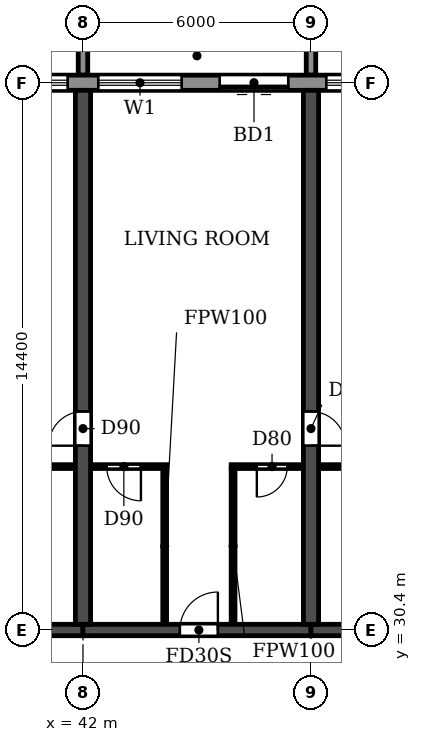
"""IFC4 building model, lengths in metres.
Left out: names, types, materials, properties, quantities, classifications, styles, units other than length and angle.
Written with IfcOpenShell. Run it as: python <this file> out.ifc"""

import sys

from ifc_helpers import new_model, si_unit, direction, frame, frame_2d, origin, place, context, subcontext, project, spatial, polyline, rectangle, outline, extrude, source, transform, mapped, element, fill, save


model = new_model("IFC4")
c1 = context("Model", 3, precision=1e-05, world=origin(), true_north=direction((0.0, 1.0)))
c2 = subcontext(c1, "Body", "Model", "MODEL_VIEW")
j1 = project(units=[si_unit("LENGTHUNIT", "METRE"), si_unit("PLANEANGLEUNIT", "RADIAN")], contexts=[c1])
p1 = place(None, origin())
s1 = spatial("IfcSite", under=j1, at=p1, CompositionType="ELEMENT")
p2 = place(p1, origin())
s2 = spatial("IfcBuilding", under=s1, at=p2, CompositionType="ELEMENT")
p3 = place(p2, frame((0.0, 0.0, 49.8)))
s3 = spatial("IfcBuildingStorey", under=s2, at=p3, CompositionType="ELEMENT", Elevation=49.8)
p4 = place(p3, frame((42.0, 30.55, 0.0), z_axis=(0.0, 0.0, 1.0), x_axis=(0.0, 1.0, 0.0)))
e1 = element("IfcWall", 1, at=p4, inside=s3, PredefinedType="SHEAR", context=c2, shape_type="SweptSolid", body=[
    extrude(rectangle(XDim=14.05, YDim=0.4, at=frame_2d((7.025, 0.0))), origin(), (0.0, 0.0, 1.0), 3.0),
])
p5 = place(p4, frame((4.7, 0.0, 0.0)))
e2 = element("IfcOpeningElement", 2, at=p5, cuts=e1, PredefinedType="OPENING", context=c2, shape_type="SweptSolid", body=[
    extrude(rectangle(XDim=0.9, YDim=2.1, at=frame_2d((0.45, 1.05))), frame((0.0, 0.21, 0.0), z_axis=(0.0, -1.0, 0.0), x_axis=(1.0, 0.0, 0.0)), (0.0, 0.0, 1.0), 0.42),
])
p6 = place(p3, frame((48.0, 30.55, 0.0), z_axis=(0.0, 0.0, 1.0), x_axis=(0.0, 1.0, 0.0)))
e3 = element("IfcWall", 3, at=p6, inside=s3, PredefinedType="SHEAR", context=c2, shape_type="SweptSolid", body=[
    extrude(rectangle(XDim=14.05, YDim=0.4, at=frame_2d((7.025, 0.0))), origin(), (0.0, 0.0, 1.0), 3.0),
])
p7 = place(p6, frame((4.7, 0.0, 0.0)))
e4 = element("IfcOpeningElement", 4, at=p7, cuts=e3, PredefinedType="OPENING", context=c2, shape_type="SweptSolid", body=[
    extrude(rectangle(XDim=0.9, YDim=2.1, at=frame_2d((0.45, 1.05))), frame((0.0, 0.21, 0.0), z_axis=(0.0, -1.0, 0.0), x_axis=(1.0, 0.0, 0.0)), (0.0, 0.0, 1.0), 0.42),
])
p8 = place(p3, frame((36.0, 30.4, 0.0), z_axis=(0.0, 0.0, 1.0), x_axis=(1.0, 0.0, 0.0)))
e5 = element("IfcWall", 5, at=p8, inside=s3, PredefinedType="SHEAR", context=c2, shape_type="SweptSolid", body=[
    extrude(rectangle(XDim=6.0, YDim=0.3, at=frame_2d((3.0, 0.0))), origin(), (0.0, 0.0, 1.0), 2.4),
])
p9 = place(p3, frame((42.0, 30.4, 0.0), z_axis=(0.0, 0.0, 1.0), x_axis=(1.0, 0.0, 0.0)))
e6 = element("IfcWall", 6, at=p9, inside=s3, PredefinedType="SHEAR", context=c2, shape_type="SweptSolid", body=[
    extrude(rectangle(XDim=6.0, YDim=0.3, at=frame_2d((3.0, 0.0))), origin(), (0.0, 0.0, 1.0), 2.4),
])
p10 = place(p9, frame((2.55, 0.0, 0.0)))
e7 = element("IfcOpeningElement", 7, at=p10, cuts=e6, PredefinedType="OPENING", context=c2, shape_type="SweptSolid", body=[
    extrude(rectangle(XDim=1.0, YDim=2.1, at=frame_2d((0.5, 1.05))), frame((0.0, 0.16, 0.0), z_axis=(0.0, -1.0, 0.0), x_axis=(1.0, 0.0, 0.0)), (0.0, 0.0, 1.0), 0.32),
])
p11 = place(p3, frame((48.0, 30.4, 0.0), z_axis=(0.0, 0.0, 1.0), x_axis=(1.0, 0.0, 0.0)))
e8 = element("IfcWall", 8, at=p11, inside=s3, PredefinedType="SHEAR", context=c2, shape_type="SweptSolid", body=[
    extrude(rectangle(XDim=6.0, YDim=0.3, at=frame_2d((3.0, 0.0))), origin(), (0.0, 0.0, 1.0), 2.4),
])
p12 = place(p3, frame((97.317, 44.8, 0.0), z_axis=(0.0, 0.0, 1.0), x_axis=(-1.0, 0.0, 0.0)))
e9 = element("IfcWall", 9, at=p12, inside=s3, PredefinedType="STANDARD", context=c2, shape_type="SweptSolid", body=[
    extrude(rectangle(XDim=92.634, YDim=0.4, at=frame_2d((46.317, 0.0))), origin(), (0.0, 0.0, 1.0), 3.0),
])
p13 = place(p12, frame((88.917, 0.0, 0.0)))
e10 = element("IfcOpeningElement", 10, at=p13, cuts=e9, PredefinedType="OPENING", context=c2, shape_type="SweptSolid", body=[
    extrude(rectangle(XDim=1.8, YDim=2.4, at=frame_2d((0.9, 1.2))), frame((0.0, 0.21, 0.0), z_axis=(0.0, -1.0, 0.0), x_axis=(1.0, 0.0, 0.0)), (0.0, 0.0, 1.0), 0.42),
])
p14 = place(p12, frame((85.717, 0.0, 0.9)))
e11 = element("IfcOpeningElement", 11, at=p14, cuts=e9, PredefinedType="OPENING", context=c2, shape_type="SweptSolid", body=[
    extrude(rectangle(XDim=2.2, YDim=1.5, at=frame_2d((1.1, 0.75))), frame((0.0, 0.21, 0.0), z_axis=(0.0, -1.0, 0.0), x_axis=(1.0, 0.0, 0.0)), (0.0, 0.0, 1.0), 0.42),
])
p15 = place(p12, frame((82.717, 0.0, 0.9)))
e12 = element("IfcOpeningElement", 12, at=p15, cuts=e9, PredefinedType="OPENING", context=c2, shape_type="SweptSolid", body=[
    extrude(rectangle(XDim=2.2, YDim=1.5, at=frame_2d((1.1, 0.75))), frame((0.0, 0.21, 0.0), z_axis=(0.0, -1.0, 0.0), x_axis=(1.0, 0.0, 0.0)), (0.0, 0.0, 1.0), 0.42),
])
p16 = place(p12, frame((79.717, 0.0, 0.9)))
e13 = element("IfcOpeningElement", 13, at=p16, cuts=e9, PredefinedType="OPENING", context=c2, shape_type="SweptSolid", body=[
    extrude(rectangle(XDim=2.2, YDim=1.5, at=frame_2d((1.1, 0.75))), frame((0.0, 0.21, 0.0), z_axis=(0.0, -1.0, 0.0), x_axis=(1.0, 0.0, 0.0)), (0.0, 0.0, 1.0), 0.42),
])
p17 = place(p12, frame((76.717, 0.0, 0.9)))
e14 = element("IfcOpeningElement", 14, at=p17, cuts=e9, PredefinedType="OPENING", context=c2, shape_type="SweptSolid", body=[
    extrude(rectangle(XDim=2.2, YDim=1.5, at=frame_2d((1.1, 0.75))), frame((0.0, 0.21, 0.0), z_axis=(0.0, -1.0, 0.0), x_axis=(1.0, 0.0, 0.0)), (0.0, 0.0, 1.0), 0.42),
])
p18 = place(p12, frame((73.917, 0.0, 0.0)))
e15 = element("IfcOpeningElement", 15, at=p18, cuts=e9, PredefinedType="OPENING", context=c2, shape_type="SweptSolid", body=[
    extrude(rectangle(XDim=1.8, YDim=2.4, at=frame_2d((0.9, 1.2))), frame((0.0, 0.21, 0.0), z_axis=(0.0, -1.0, 0.0), x_axis=(1.0, 0.0, 0.0)), (0.0, 0.0, 1.0), 0.42),
])
p19 = place(p12, frame((70.717, 0.0, 0.9)))
e16 = element("IfcOpeningElement", 16, at=p19, cuts=e9, PredefinedType="OPENING", context=c2, shape_type="SweptSolid", body=[
    extrude(rectangle(XDim=2.2, YDim=1.5, at=frame_2d((1.1, 0.75))), frame((0.0, 0.21, 0.0), z_axis=(0.0, -1.0, 0.0), x_axis=(1.0, 0.0, 0.0)), (0.0, 0.0, 1.0), 0.42),
])
p20 = place(p12, frame((67.717, 0.0, 0.9)))
e17 = element("IfcOpeningElement", 17, at=p20, cuts=e9, PredefinedType="OPENING", context=c2, shape_type="SweptSolid", body=[
    extrude(rectangle(XDim=2.2, YDim=1.5, at=frame_2d((1.1, 0.75))), frame((0.0, 0.21, 0.0), z_axis=(0.0, -1.0, 0.0), x_axis=(1.0, 0.0, 0.0)), (0.0, 0.0, 1.0), 0.42),
])
p21 = place(p12, frame((64.717, 0.0, 0.9)))
e18 = element("IfcOpeningElement", 18, at=p21, cuts=e9, PredefinedType="OPENING", context=c2, shape_type="SweptSolid", body=[
    extrude(rectangle(XDim=2.2, YDim=1.5, at=frame_2d((1.1, 0.75))), frame((0.0, 0.21, 0.0), z_axis=(0.0, -1.0, 0.0), x_axis=(1.0, 0.0, 0.0)), (0.0, 0.0, 1.0), 0.42),
])
p22 = place(p12, frame((61.917, 0.0, 0.0)))
e19 = element("IfcOpeningElement", 19, at=p22, cuts=e9, PredefinedType="OPENING", context=c2, shape_type="SweptSolid", body=[
    extrude(rectangle(XDim=1.8, YDim=2.4, at=frame_2d((0.9, 1.2))), frame((0.0, 0.21, 0.0), z_axis=(0.0, -1.0, 0.0), x_axis=(1.0, 0.0, 0.0)), (0.0, 0.0, 1.0), 0.42),
])
p23 = place(p12, frame((58.717, 0.0, 0.9)))
e20 = element("IfcOpeningElement", 20, at=p23, cuts=e9, PredefinedType="OPENING", context=c2, shape_type="SweptSolid", body=[
    extrude(rectangle(XDim=2.2, YDim=1.5, at=frame_2d((1.1, 0.75))), frame((0.0, 0.21, 0.0), z_axis=(0.0, -1.0, 0.0), x_axis=(1.0, 0.0, 0.0)), (0.0, 0.0, 1.0), 0.42),
])
p24 = place(p12, frame((55.717, 0.0, 0.9)))
e21 = element("IfcOpeningElement", 21, at=p24, cuts=e9, PredefinedType="OPENING", context=c2, shape_type="SweptSolid", body=[
    extrude(rectangle(XDim=2.2, YDim=1.5, at=frame_2d((1.1, 0.75))), frame((0.0, 0.21, 0.0), z_axis=(0.0, -1.0, 0.0), x_axis=(1.0, 0.0, 0.0)), (0.0, 0.0, 1.0), 0.42),
])
p25 = place(p12, frame((52.717, 0.0, 0.9)))
e22 = element("IfcOpeningElement", 22, at=p25, cuts=e9, PredefinedType="OPENING", context=c2, shape_type="SweptSolid", body=[
    extrude(rectangle(XDim=2.2, YDim=1.5, at=frame_2d((1.1, 0.75))), frame((0.0, 0.21, 0.0), z_axis=(0.0, -1.0, 0.0), x_axis=(1.0, 0.0, 0.0)), (0.0, 0.0, 1.0), 0.42),
])
p26 = place(p12, frame((49.917, 0.0, 0.0)))
e23 = element("IfcOpeningElement", 23, at=p26, cuts=e9, PredefinedType="OPENING", context=c2, shape_type="SweptSolid", body=[
    extrude(rectangle(XDim=1.8, YDim=2.4, at=frame_2d((0.9, 1.2))), frame((0.0, 0.21, 0.0), z_axis=(0.0, -1.0, 0.0), x_axis=(1.0, 0.0, 0.0)), (0.0, 0.0, 1.0), 0.42),
])
p27 = place(p12, frame((46.717, 0.0, 0.9)))
e24 = element("IfcOpeningElement", 24, at=p27, cuts=e9, PredefinedType="OPENING", context=c2, shape_type="SweptSolid", body=[
    extrude(rectangle(XDim=2.2, YDim=1.5, at=frame_2d((1.1, 0.75))), frame((0.0, 0.21, 0.0), z_axis=(0.0, -1.0, 0.0), x_axis=(1.0, 0.0, 0.0)), (0.0, 0.0, 1.0), 0.42),
])
p28 = place(p12, frame((43.717, 0.0, 0.9)))
e25 = element("IfcOpeningElement", 25, at=p28, cuts=e9, PredefinedType="OPENING", context=c2, shape_type="SweptSolid", body=[
    extrude(rectangle(XDim=2.2, YDim=1.5, at=frame_2d((1.1, 0.75))), frame((0.0, 0.21, 0.0), z_axis=(0.0, -1.0, 0.0), x_axis=(1.0, 0.0, 0.0)), (0.0, 0.0, 1.0), 0.42),
])
p29 = place(p12, frame((40.717, 0.0, 0.9)))
e26 = element("IfcOpeningElement", 26, at=p29, cuts=e9, PredefinedType="OPENING", context=c2, shape_type="SweptSolid", body=[
    extrude(rectangle(XDim=2.2, YDim=1.5, at=frame_2d((1.1, 0.75))), frame((0.0, 0.21, 0.0), z_axis=(0.0, -1.0, 0.0), x_axis=(1.0, 0.0, 0.0)), (0.0, 0.0, 1.0), 0.42),
])
p30 = place(p12, frame((37.917, 0.0, 0.0)))
e27 = element("IfcOpeningElement", 27, at=p30, cuts=e9, PredefinedType="OPENING", context=c2, shape_type="SweptSolid", body=[
    extrude(rectangle(XDim=1.8, YDim=2.4, at=frame_2d((0.9, 1.2))), frame((0.0, 0.21, 0.0), z_axis=(0.0, -1.0, 0.0), x_axis=(1.0, 0.0, 0.0)), (0.0, 0.0, 1.0), 0.42),
])
p31 = place(p12, frame((34.717, 0.0, 0.9)))
e28 = element("IfcOpeningElement", 28, at=p31, cuts=e9, PredefinedType="OPENING", context=c2, shape_type="SweptSolid", body=[
    extrude(rectangle(XDim=2.2, YDim=1.5, at=frame_2d((1.1, 0.75))), frame((0.0, 0.21, 0.0), z_axis=(0.0, -1.0, 0.0), x_axis=(1.0, 0.0, 0.0)), (0.0, 0.0, 1.0), 0.42),
])
p32 = place(p12, frame((31.717, 0.0, 0.9)))
e29 = element("IfcOpeningElement", 29, at=p32, cuts=e9, PredefinedType="OPENING", context=c2, shape_type="SweptSolid", body=[
    extrude(rectangle(XDim=2.2, YDim=1.5, at=frame_2d((1.1, 0.75))), frame((0.0, 0.21, 0.0), z_axis=(0.0, -1.0, 0.0), x_axis=(1.0, 0.0, 0.0)), (0.0, 0.0, 1.0), 0.42),
])
p33 = place(p12, frame((28.717, 0.0, 0.9)))
e30 = element("IfcOpeningElement", 30, at=p33, cuts=e9, PredefinedType="OPENING", context=c2, shape_type="SweptSolid", body=[
    extrude(rectangle(XDim=2.2, YDim=1.5, at=frame_2d((1.1, 0.75))), frame((0.0, 0.21, 0.0), z_axis=(0.0, -1.0, 0.0), x_axis=(1.0, 0.0, 0.0)), (0.0, 0.0, 1.0), 0.42),
])
p34 = place(p12, frame((25.917, 0.0, 0.0)))
e31 = element("IfcOpeningElement", 31, at=p34, cuts=e9, PredefinedType="OPENING", context=c2, shape_type="SweptSolid", body=[
    extrude(rectangle(XDim=1.8, YDim=2.4, at=frame_2d((0.9, 1.2))), frame((0.0, 0.21, 0.0), z_axis=(0.0, -1.0, 0.0), x_axis=(1.0, 0.0, 0.0)), (0.0, 0.0, 1.0), 0.42),
])
p35 = place(p12, frame((22.917, 0.0, 0.0)))
e32 = element("IfcOpeningElement", 32, at=p35, cuts=e9, PredefinedType="OPENING", context=c2, shape_type="SweptSolid", body=[
    extrude(rectangle(XDim=1.8, YDim=2.4, at=frame_2d((0.9, 1.2))), frame((0.0, 0.21, 0.0), z_axis=(0.0, -1.0, 0.0), x_axis=(1.0, 0.0, 0.0)), (0.0, 0.0, 1.0), 0.42),
])
p36 = place(p12, frame((19.717, 0.0, 0.9)))
e33 = element("IfcOpeningElement", 33, at=p36, cuts=e9, PredefinedType="OPENING", context=c2, shape_type="SweptSolid", body=[
    extrude(rectangle(XDim=2.2, YDim=1.5, at=frame_2d((1.1, 0.75))), frame((0.0, 0.21, 0.0), z_axis=(0.0, -1.0, 0.0), x_axis=(1.0, 0.0, 0.0)), (0.0, 0.0, 1.0), 0.42),
])
p37 = place(p12, frame((16.717, 0.0, 0.9)))
e34 = element("IfcOpeningElement", 34, at=p37, cuts=e9, PredefinedType="OPENING", context=c2, shape_type="SweptSolid", body=[
    extrude(rectangle(XDim=2.2, YDim=1.5, at=frame_2d((1.1, 0.75))), frame((0.0, 0.21, 0.0), z_axis=(0.0, -1.0, 0.0), x_axis=(1.0, 0.0, 0.0)), (0.0, 0.0, 1.0), 0.42),
])
p38 = place(p12, frame((13.717, 0.0, 0.9)))
e35 = element("IfcOpeningElement", 35, at=p38, cuts=e9, PredefinedType="OPENING", context=c2, shape_type="SweptSolid", body=[
    extrude(rectangle(XDim=2.2, YDim=1.5, at=frame_2d((1.1, 0.75))), frame((0.0, 0.21, 0.0), z_axis=(0.0, -1.0, 0.0), x_axis=(1.0, 0.0, 0.0)), (0.0, 0.0, 1.0), 0.42),
])
p39 = place(p12, frame((10.717, 0.0, 0.9)))
e36 = element("IfcOpeningElement", 36, at=p39, cuts=e9, PredefinedType="OPENING", context=c2, shape_type="SweptSolid", body=[
    extrude(rectangle(XDim=2.2, YDim=1.5, at=frame_2d((1.1, 0.75))), frame((0.0, 0.21, 0.0), z_axis=(0.0, -1.0, 0.0), x_axis=(1.0, 0.0, 0.0)), (0.0, 0.0, 1.0), 0.42),
])
p40 = place(p12, frame((7.917, 0.0, 0.0)))
e37 = element("IfcOpeningElement", 37, at=p40, cuts=e9, PredefinedType="OPENING", context=c2, shape_type="SweptSolid", body=[
    extrude(rectangle(XDim=1.8, YDim=2.4, at=frame_2d((0.9, 1.2))), frame((0.0, 0.21, 0.0), z_axis=(0.0, -1.0, 0.0), x_axis=(1.0, 0.0, 0.0)), (0.0, 0.0, 1.0), 0.42),
])
p41 = place(p12, frame((4.717, 0.0, 0.9)))
e38 = element("IfcOpeningElement", 38, at=p41, cuts=e9, PredefinedType="OPENING", context=c2, shape_type="SweptSolid", body=[
    extrude(rectangle(XDim=2.2, YDim=1.5, at=frame_2d((1.1, 0.75))), frame((0.0, 0.21, 0.0), z_axis=(0.0, -1.0, 0.0), x_axis=(1.0, 0.0, 0.0)), (0.0, 0.0, 1.0), 0.42),
])
p42 = place(p12, frame((1.917, 0.0, 0.0)))
e39 = element("IfcOpeningElement", 39, at=p42, cuts=e9, PredefinedType="OPENING", context=c2, shape_type="SweptSolid", body=[
    extrude(rectangle(XDim=1.8, YDim=2.4, at=frame_2d((0.9, 1.2))), frame((0.0, 0.21, 0.0), z_axis=(0.0, -1.0, 0.0), x_axis=(1.0, 0.0, 0.0)), (0.0, 0.0, 1.0), 0.42),
])
m1 = source(origin(), c2, "Body", "SweptSolid", [
    extrude(outline(polyline([(0.0, 0.0), (0.25, 0.0), (0.25, 3.1), (0.0, 3.1), (0.0, 0.0)])), origin(), (0.0, 0.0, 1.0), 3.1),
])
for number, where in (
    (40, (41.875, 45.0, 0.0)),
    (41, (47.875, 45.0, 0.0)),
):
    element("IfcWall", number, at=place(p3, frame(where)), inside=s3, PredefinedType="STANDARD", context=c2, shape_type="MappedRepresentation", body=[
        mapped(m1, transform((0.0, 0.0, 0.0))),
    ])
p43 = place(p3, frame((39.1, 34.7, 0.0), z_axis=(0.0, 0.0, 1.0), x_axis=(1.0, 0.0, 0.0)))
e42 = element("IfcWall", 42, at=p43, inside=s3, PredefinedType="PARTITIONING", context=c2, shape_type="SweptSolid", body=[
    extrude(rectangle(XDim=2.69, YDim=0.1, at=frame_2d((1.345, 0.0))), origin(), (0.0, 0.0, 1.0), 3.0),
])
p44 = place(p43, frame((1.0, 0.0, 0.0)))
e43 = element("IfcOpeningElement", 43, at=p44, cuts=e42, PredefinedType="OPENING", context=c2, shape_type="SweptSolid", body=[
    extrude(rectangle(XDim=0.8, YDim=2.1, at=frame_2d((0.4, 1.05))), frame((0.0, 0.06, 0.0), z_axis=(0.0, -1.0, 0.0), x_axis=(1.0, 0.0, 0.0)), (0.0, 0.0, 1.0), 0.12),
])
p45 = place(p3, frame((42.21, 34.7, 0.0), z_axis=(0.0, 0.0, 1.0), x_axis=(1.0, 0.0, 0.0)))
e44 = element("IfcWall", 44, at=p45, inside=s3, PredefinedType="PARTITIONING", context=c2, shape_type="SweptSolid", body=[
    extrude(rectangle(XDim=1.99, YDim=0.1, at=frame_2d((0.995, 0.0))), origin(), (0.0, 0.0, 1.0), 3.0),
])
p46 = place(p45, frame((0.415, 0.0, 0.0)))
e45 = element("IfcOpeningElement", 45, at=p46, cuts=e44, PredefinedType="OPENING", context=c2, shape_type="SweptSolid", body=[
    extrude(rectangle(XDim=0.9, YDim=2.1, at=frame_2d((0.45, 1.05))), frame((0.0, 0.06, 0.0), z_axis=(0.0, -1.0, 0.0), x_axis=(1.0, 0.0, 0.0)), (0.0, 0.0, 1.0), 0.12),
])
p47 = place(p3, frame((45.9, 34.7, 0.0), z_axis=(0.0, 0.0, 1.0), x_axis=(1.0, 0.0, 0.0)))
e46 = element("IfcWall", 46, at=p47, inside=s3, PredefinedType="PARTITIONING", context=c2, shape_type="SweptSolid", body=[
    extrude(rectangle(XDim=1.89, YDim=0.1, at=frame_2d((0.945, 0.0))), origin(), (0.0, 0.0, 1.0), 3.0),
])
p48 = place(p47, frame((0.675, 0.0, 0.0)))
e47 = element("IfcOpeningElement", 47, at=p48, cuts=e46, PredefinedType="OPENING", context=c2, shape_type="SweptSolid", body=[
    extrude(rectangle(XDim=0.8, YDim=2.1, at=frame_2d((0.4, 1.05))), frame((0.0, 0.06, 0.0), z_axis=(0.0, -1.0, 0.0), x_axis=(1.0, 0.0, 0.0)), (0.0, 0.0, 1.0), 0.12),
])
p49 = place(p3, frame((48.21, 34.7, 0.0), z_axis=(0.0, 0.0, 1.0), x_axis=(1.0, 0.0, 0.0)))
e48 = element("IfcWall", 48, at=p49, inside=s3, PredefinedType="PARTITIONING", context=c2, shape_type="SweptSolid", body=[
    extrude(rectangle(XDim=2.69, YDim=0.1, at=frame_2d((1.345, 0.0))), origin(), (0.0, 0.0, 1.0), 3.0),
])
p50 = place(p49, frame((0.89, 0.0, 0.0)))
e49 = element("IfcOpeningElement", 49, at=p50, cuts=e48, PredefinedType="OPENING", context=c2, shape_type="SweptSolid", body=[
    extrude(rectangle(XDim=0.8, YDim=2.1, at=frame_2d((0.4, 1.05))), frame((0.0, 0.06, 0.0), z_axis=(0.0, -1.0, 0.0), x_axis=(1.0, 0.0, 0.0)), (0.0, 0.0, 1.0), 0.12),
])
for number, where, z_axis, x_axis in (
    (50, (44.15, 30.56, 0.0), (0.0, 0.0, 1.0), (0.0, 1.0, 0.0)),
    (51, (45.95, 30.56, 0.0), (0.0, 0.0, 1.0), (0.0, 1.0, 0.0)),
):
    element("IfcWall", number, at=place(p3, frame(where, z_axis=z_axis, x_axis=x_axis)), inside=s3, PredefinedType="PARTITIONING", context=c2, shape_type="SweptSolid", body=[
        extrude(rectangle(XDim=4.09, YDim=0.1, at=frame_2d((2.045, 0.0))), origin(), (0.0, 0.0, 1.0), 3.0),
    ])
p51 = place(p24, origin())
e52 = element("IfcWindow", 52, at=p51, inside=s3, PartitioningType="DOUBLE_PANEL_HORIZONTAL", PredefinedType="WINDOW", context=c2, shape_type="SweptSolid", body=[
    extrude(rectangle(XDim=2.2, YDim=1.5, at=frame_2d((1.1, 0.75))), frame((0.0, 0.03, 0.0), z_axis=(0.0, -1.0, 0.0), x_axis=(1.0, 0.0, 0.0)), (0.0, 0.0, 1.0), 0.06),
])
fill(e21, e52)
p52 = place(p25, origin())
e53 = element("IfcWindow", 53, at=p52, inside=s3, PartitioningType="DOUBLE_PANEL_HORIZONTAL", PredefinedType="WINDOW", context=c2, shape_type="SweptSolid", body=[
    extrude(rectangle(XDim=2.2, YDim=1.5, at=frame_2d((1.1, 0.75))), frame((0.0, 0.03, 0.0), z_axis=(0.0, -1.0, 0.0), x_axis=(1.0, 0.0, 0.0)), (0.0, 0.0, 1.0), 0.06),
])
fill(e22, e53)
p53 = place(p26, origin())
e54 = element("IfcDoor", 54, at=p53, inside=s3, OperationType="DOUBLE_DOOR_SLIDING", PredefinedType="DOOR", context=c2, shape_type="SweptSolid", body=[
    extrude(rectangle(XDim=1.8, YDim=2.4, at=frame_2d((0.9, 1.2))), frame((0.0, 0.025, 0.0), z_axis=(0.0, -1.0, 0.0), x_axis=(1.0, 0.0, 0.0)), (0.0, 0.0, 1.0), 0.05),
])
fill(e23, e54)
p54 = place(p27, origin())
e55 = element("IfcWindow", 55, at=p54, inside=s3, PartitioningType="DOUBLE_PANEL_HORIZONTAL", PredefinedType="WINDOW", context=c2, shape_type="SweptSolid", body=[
    extrude(rectangle(XDim=2.2, YDim=1.5, at=frame_2d((1.1, 0.75))), frame((0.0, 0.03, 0.0), z_axis=(0.0, -1.0, 0.0), x_axis=(1.0, 0.0, 0.0)), (0.0, 0.0, 1.0), 0.06),
])
fill(e24, e55)
p55 = place(p5, origin())
e56 = element("IfcDoor", 56, at=p55, inside=s3, OperationType="SINGLE_SWING_LEFT", PredefinedType="DOOR", context=c2, shape_type="SweptSolid", body=[
    extrude(rectangle(XDim=0.9, YDim=2.1, at=frame_2d((0.45, 1.05))), frame((0.0, 0.025, 0.0), z_axis=(0.0, -1.0, 0.0), x_axis=(1.0, 0.0, 0.0)), (0.0, 0.0, 1.0), 0.05),
])
fill(e2, e56)
p56 = place(p46, frame((0.9, 0.0, 0.0), z_axis=(0.0, 0.0, 1.0), x_axis=(-1.0, 0.0, 0.0)))
e57 = element("IfcDoor", 57, at=p56, inside=s3, OperationType="SINGLE_SWING_LEFT", PredefinedType="DOOR", context=c2, shape_type="SweptSolid", body=[
    extrude(rectangle(XDim=0.9, YDim=2.1, at=frame_2d((0.45, 1.05))), frame((0.0, 0.025, 0.0), z_axis=(0.0, -1.0, 0.0), x_axis=(1.0, 0.0, 0.0)), (0.0, 0.0, 1.0), 0.05),
])
fill(e45, e57)
p57 = place(p10, origin())
e58 = element("IfcDoor", 58, at=p57, inside=s3, OperationType="SINGLE_SWING_RIGHT", PredefinedType="DOOR", context=c2, shape_type="SweptSolid", body=[
    extrude(rectangle(XDim=1.0, YDim=2.1, at=frame_2d((0.5, 1.05))), frame((0.0, 0.025, 0.0), z_axis=(0.0, -1.0, 0.0), x_axis=(1.0, 0.0, 0.0)), (0.0, 0.0, 1.0), 0.05),
])
fill(e7, e58)
p58 = place(p48, frame((0.8, 0.0, 0.0), z_axis=(0.0, 0.0, 1.0), x_axis=(-1.0, 0.0, 0.0)))
e59 = element("IfcDoor", 59, at=p58, inside=s3, OperationType="SINGLE_SWING_RIGHT", PredefinedType="DOOR", context=c2, shape_type="SweptSolid", body=[
    extrude(rectangle(XDim=0.8, YDim=2.1, at=frame_2d((0.4, 1.05))), frame((0.0, 0.025, 0.0), z_axis=(0.0, -1.0, 0.0), x_axis=(1.0, 0.0, 0.0)), (0.0, 0.0, 1.0), 0.05),
])
fill(e47, e59)
p59 = place(p7, frame((0.9, 0.0, 0.0), z_axis=(0.0, 0.0, 1.0), x_axis=(-1.0, 0.0, 0.0)))
e60 = element("IfcDoor", 60, at=p59, inside=s3, OperationType="SINGLE_SWING_RIGHT", PredefinedType="DOOR", context=c2, shape_type="SweptSolid", body=[
    extrude(rectangle(XDim=0.9, YDim=2.1, at=frame_2d((0.45, 1.05))), frame((0.0, 0.025, 0.0), z_axis=(0.0, -1.0, 0.0), x_axis=(1.0, 0.0, 0.0)), (0.0, 0.0, 1.0), 0.05),
])
fill(e4, e60)
save(model, sys.argv[1])
